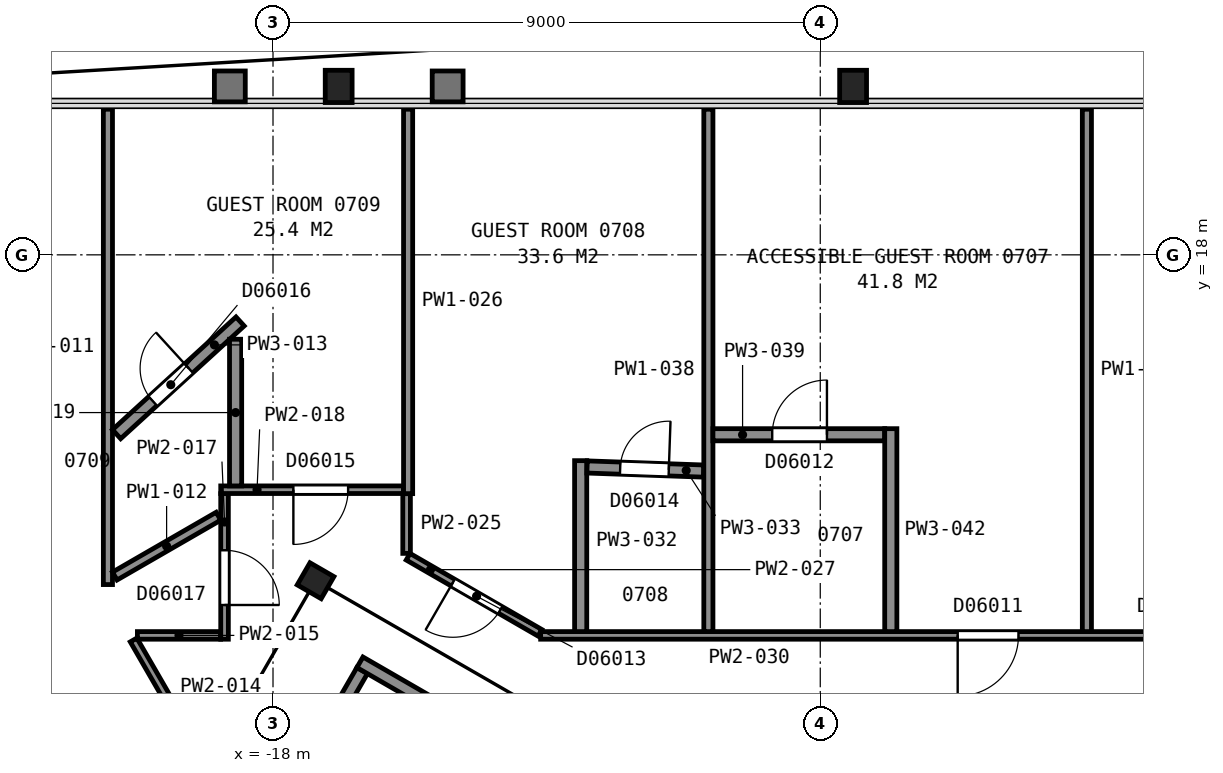
"""IFC4 building model, lengths in metres.
Left out: names, types, materials, properties, quantities, classifications, styles, units other than length and angle.
Written with IfcOpenShell. Run it as: python <this file> out.ifc"""

import sys

from ifc_helpers import new_model, si_unit, direction, frame, frame_2d, origin, origin_2d, place, context, subcontext, project, spatial, rectangle, i_section, extrude, element, fill, save


model = new_model("IFC4")
c1 = context("Model", 3, precision=1e-05, world=origin(), true_north=direction((0.0, 1.0)))
c2 = subcontext(c1, "Body", "Model", "MODEL_VIEW")
j1 = project(units=[si_unit("LENGTHUNIT", "METRE"), si_unit("PLANEANGLEUNIT", "RADIAN")], contexts=[c1])
p1 = place(None, origin())
s1 = spatial("IfcSite", under=j1, at=p1, CompositionType="ELEMENT")
p2 = place(p1, origin())
s2 = spatial("IfcBuilding", under=s1, at=p2, CompositionType="ELEMENT")
p3 = place(p2, frame((0.0, 0.0, 40.4)))
s3 = spatial("IfcBuildingStorey", under=s2, at=p3, CompositionType="ELEMENT", Elevation=40.4)
for number, where, z_axis, x_axis in (
    (1, (-8.46, 20.77, 0.0), (0.0, 0.0, 1.0), (1.0, 0.0, 0.0)),
    (2, (-16.92, 20.77, 0.0), (0.0, 0.0, 1.0), (1.0, 0.0, 0.0)),
):
    element("IfcColumn", number, at=place(p3, frame(where, z_axis=z_axis, x_axis=x_axis)), inside=s3, PredefinedType="COLUMN", context=c2, shape_type="SweptSolid", body=[
        extrude(i_section(OverallWidth=0.442, OverallDepth=0.531, WebThickness=0.066, FlangeThickness=0.106, FilletRadius=0.015, at=origin_2d()), origin(), (0.0, 0.0, 1.0), 3.575),
    ])
p4 = place(p3, frame((-17.3, 12.64, 0.0), z_axis=(0.0, 0.0, 1.0), x_axis=(0.5, 0.866025403784, 0.0)))
e3 = element("IfcColumn", 3, at=p4, inside=s3, PredefinedType="COLUMN", context=c2, shape_type="SweptSolid", body=[
    extrude(i_section(OverallWidth=0.419, OverallDepth=0.455, WebThickness=0.042, FlangeThickness=0.068, FilletRadius=0.015, at=origin_2d()), origin(), (0.0, 0.0, 1.0), 3.6),
])
p5 = place(p3, frame((-16.534, 11.162, 0.0), z_axis=(0.0, 0.0, 1.0), x_axis=(-0.49998411664, -0.866034573852, 0.0)))
e4 = element("IfcWall", 4, at=p5, inside=s3, PredefinedType="PARTITIONING", context=c2, shape_type="SweptSolid", body=[
    extrude(rectangle(XDim=2.8, YDim=0.2, at=frame_2d((1.4, 0.0))), origin(), (0.0, 0.0, 1.0), 3.35),
])
p6 = place(p5, frame((0.85, 0.0, 0.0)))
e5 = element("IfcOpeningElement", 5, at=p6, cuts=e4, PredefinedType="OPENING", context=c2, shape_type="SweptSolid", body=[
    extrude(rectangle(XDim=1.1, YDim=2.1, at=frame_2d((0.55, 1.05))), frame((0.0, 0.11, 0.0), z_axis=(0.0, -1.0, 0.0), x_axis=(1.0, 0.0, 0.0)), (0.0, 0.0, 1.0), 0.22),
])
p7 = place(p3, frame((-6.178, 5.299, 0.0), z_axis=(0.0, 0.0, 1.0), x_axis=(-0.866026010844, 0.49999894854, 0.0)))
e6 = element("IfcWall", 6, at=p7, inside=s3, PredefinedType="PARTITIONING", context=c2, shape_type="SweptSolid", body=[
    extrude(rectangle(XDim=12.0, YDim=0.2, at=frame_2d((6.0, 0.0))), origin(), (0.0, 0.0, 1.0), 3.35),
])
p8 = place(p3, frame((-20.715, 12.577, 0.0), z_axis=(0.0, 0.0, 1.0), x_axis=(0.0, 1.0, 0.0)))
e7 = element("IfcWall", 7, at=p8, inside=s3, PredefinedType="PARTITIONING", context=c2, shape_type="SweptSolid", body=[
    extrude(rectangle(XDim=7.818, YDim=0.15, at=frame_2d((3.909, 0.0))), origin(), (0.0, 0.0, 1.0), 2.613),
])
p9 = place(p3, frame((-20.602, 12.717, 0.0), z_axis=(0.0, 0.0, 1.0), x_axis=(0.866121584746, 0.499833372672, 0.0)))
e8 = element("IfcWall", 8, at=p9, inside=s3, PredefinedType="PARTITIONING", context=c2, shape_type="SweptSolid", body=[
    extrude(rectangle(XDim=1.969, YDim=0.15, at=frame_2d((0.984, 0.0))), origin(), (0.0, 0.0, 1.0), 2.613),
])
p10 = place(p3, frame((-18.541, 16.905, 0.0), z_axis=(0.0, 0.0, 1.0), x_axis=(-0.738508553587, -0.674244107337, 0.0)))
e9 = element("IfcWall", 9, at=p10, inside=s3, PredefinedType="PARTITIONING", context=c2, shape_type="SweptSolid", body=[
    extrude(rectangle(XDim=2.75, YDim=0.2, at=frame_2d((1.375, 0.0))), origin(), (0.0, 0.0, 1.0), 2.613),
])
p11 = place(p10, frame((1.143, 0.0, 0.0)))
e10 = element("IfcOpeningElement", 10, at=p11, cuts=e9, PredefinedType="OPENING", context=c2, shape_type="SweptSolid", body=[
    extrude(rectangle(XDim=0.8, YDim=2.1, at=frame_2d((0.4, 1.05))), frame((0.0, 0.11, 0.0), z_axis=(0.0, -1.0, 0.0), x_axis=(1.0, 0.0, 0.0)), (0.0, 0.0, 1.0), 0.22),
])
p12 = place(p3, frame((-20.293, 11.666, 0.0), z_axis=(0.0, 0.0, 1.0), x_axis=(0.500327160669, -0.865836435071, 0.0)))
e11 = element("IfcWall", 11, at=p12, inside=s3, PredefinedType="PARTITIONING", context=c2, shape_type="SweptSolid", body=[
    extrude(rectangle(XDim=1.805, YDim=0.125, at=frame_2d((0.903, 0.0))), origin(), (0.0, 0.0, 1.0), 2.613),
])
p13 = place(p3, frame((-20.23, 11.741, 0.0), z_axis=(0.0, 0.0, 1.0), x_axis=(1.0, 0.0, 0.0)))
e12 = element("IfcWall", 12, at=p13, inside=s3, PredefinedType="PARTITIONING", context=c2, shape_type="SweptSolid", body=[
    extrude(rectangle(XDim=1.368, YDim=0.125, at=frame_2d((0.684, 0.0))), origin(), (0.0, 0.0, 1.0), 2.613),
])
p14 = place(p3, frame((-18.797, 11.678, 0.0), z_axis=(0.0, 0.0, 1.0), x_axis=(0.0, 1.0, 0.0)))
e13 = element("IfcWall", 13, at=p14, inside=s3, PredefinedType="PARTITIONING", context=c2, shape_type="SweptSolid", body=[
    extrude(rectangle(XDim=2.394, YDim=0.125, at=frame_2d((1.197, 0.0))), origin(), (0.0, 0.0, 1.0), 2.613),
])
p15 = place(p14, frame((0.562, 0.0, 0.0)))
e14 = element("IfcOpeningElement", 14, at=p15, cuts=e13, PredefinedType="OPENING", context=c2, shape_type="SweptSolid", body=[
    extrude(rectangle(XDim=0.9, YDim=2.1, at=frame_2d((0.45, 1.05))), frame((0.0, 0.073, 0.0), z_axis=(0.0, -1.0, 0.0), x_axis=(1.0, 0.0, 0.0)), (0.0, 0.0, 1.0), 0.145),
])
p16 = place(p3, frame((-18.86, 14.137, 0.0), z_axis=(0.0, 0.0, 1.0), x_axis=(1.0, 0.0, 0.0)))
e15 = element("IfcWall", 15, at=p16, inside=s3, PredefinedType="PARTITIONING", context=c2, shape_type="SweptSolid", body=[
    extrude(rectangle(XDim=3.004, YDim=0.125, at=frame_2d((1.502, 0.0))), origin(), (0.0, 0.0, 1.0), 2.613),
])
p17 = place(p16, frame((1.195, 0.0, 0.0)))
e16 = element("IfcOpeningElement", 16, at=p17, cuts=e15, PredefinedType="OPENING", context=c2, shape_type="SweptSolid", body=[
    extrude(rectangle(XDim=0.9, YDim=2.1, at=frame_2d((0.45, 1.05))), frame((0.0, 0.073, 0.0), z_axis=(0.0, -1.0, 0.0), x_axis=(1.0, 0.0, 0.0)), (0.0, 0.0, 1.0), 0.145),
])
p18 = place(p3, frame((-18.615, 14.199, 0.0), z_axis=(0.0, 0.0, 1.0), x_axis=(0.0, 1.0, 0.0)))
e17 = element("IfcWall", 17, at=p18, inside=s3, PredefinedType="PARTITIONING", context=c2, shape_type="SweptSolid", body=[
    extrude(rectangle(XDim=2.413, YDim=0.2, at=frame_2d((1.206, 0.0))), origin(), (0.0, 0.0, 1.0), 2.613),
])
p19 = place(p3, frame((-15.803, 13.09, 0.0), z_axis=(0.0, 0.0, 1.0), x_axis=(0.0, 1.0, 0.0)))
e18 = element("IfcWall", 18, at=p19, inside=s3, PredefinedType="PARTITIONING", context=c2, shape_type="SweptSolid", body=[
    extrude(rectangle(XDim=0.982, YDim=0.125, at=frame_2d((0.491, 0.0))), origin(), (0.0, 0.0, 1.0), 2.613),
])
p20 = place(p3, frame((-15.778, 14.073, 0.0), z_axis=(0.0, 0.0, 1.0), x_axis=(0.0, 1.0, 0.0)))
e19 = element("IfcWall", 19, at=p20, inside=s3, PredefinedType="PARTITIONING", context=c2, shape_type="SweptSolid", body=[
    extrude(rectangle(XDim=6.323, YDim=0.15, at=frame_2d((3.161, 0.0))), origin(), (0.0, 0.0, 1.0), 2.613),
])
p21 = place(p3, frame((-15.778, 13.035, 0.0), z_axis=(0.0, 0.0, 1.0), x_axis=(0.866110899347, -0.499851888094, 0.0)))
e20 = element("IfcWall", 20, at=p21, inside=s3, PredefinedType="PARTITIONING", context=c2, shape_type="SweptSolid", body=[
    extrude(rectangle(XDim=2.504, YDim=0.125, at=frame_2d((1.252, 0.0))), origin(), (0.0, 0.0, 1.0), 2.613),
])
p22 = place(p21, frame((0.85, 0.0, 0.0)))
e21 = element("IfcOpeningElement", 21, at=p22, cuts=e20, PredefinedType="OPENING", context=c2, shape_type="SweptSolid", body=[
    extrude(rectangle(XDim=0.9, YDim=2.1, at=frame_2d((0.45, 1.05))), frame((0.0, 0.073, 0.0), z_axis=(0.0, -1.0, 0.0), x_axis=(1.0, 0.0, 0.0)), (0.0, 0.0, 1.0), 0.145),
])
p23 = place(p3, frame((-13.598, 11.741, 0.0), z_axis=(0.0, 0.0, 1.0), x_axis=(1.0, 0.0, 0.0)))
e22 = element("IfcWall", 22, at=p23, inside=s3, PredefinedType="PARTITIONING", context=c2, shape_type="SweptSolid", body=[
    extrude(rectangle(XDim=27.197, YDim=0.125, at=frame_2d((13.598, 0.0))), origin(), (0.0, 0.0, 1.0), 2.613),
])
p24 = place(p23, frame((20.107, 0.0, 0.0)))
e23 = element("IfcOpeningElement", 23, at=p24, cuts=e22, PredefinedType="OPENING", context=c2, shape_type="SweptSolid", body=[
    extrude(rectangle(XDim=0.9, YDim=2.1, at=frame_2d((0.45, 1.05))), frame((0.0, 0.073, 0.0), z_axis=(0.0, -1.0, 0.0), x_axis=(1.0, 0.0, 0.0)), (0.0, 0.0, 1.0), 0.145),
])
p25 = place(p23, frame((16.97, 0.0, 0.0)))
e24 = element("IfcOpeningElement", 24, at=p25, cuts=e22, PredefinedType="OPENING", context=c2, shape_type="SweptSolid", body=[
    extrude(rectangle(XDim=0.9, YDim=2.1, at=frame_2d((0.45, 1.05))), frame((0.0, 0.073, 0.0), z_axis=(0.0, -1.0, 0.0), x_axis=(1.0, 0.0, 0.0)), (0.0, 0.0, 1.0), 0.145),
])
p26 = place(p23, frame((9.934, 0.0, 0.0)))
e25 = element("IfcOpeningElement", 25, at=p26, cuts=e22, PredefinedType="OPENING", context=c2, shape_type="SweptSolid", body=[
    extrude(rectangle(XDim=0.9, YDim=2.1, at=frame_2d((0.45, 1.05))), frame((0.0, 0.073, 0.0), z_axis=(0.0, -1.0, 0.0), x_axis=(1.0, 0.0, 0.0)), (0.0, 0.0, 1.0), 0.145),
])
p27 = place(p23, frame((6.858, 0.0, 0.0)))
e26 = element("IfcOpeningElement", 26, at=p27, cuts=e22, PredefinedType="OPENING", context=c2, shape_type="SweptSolid", body=[
    extrude(rectangle(XDim=1.0, YDim=2.1, at=frame_2d((0.5, 1.05))), frame((0.0, 0.073, 0.0), z_axis=(0.0, -1.0, 0.0), x_axis=(1.0, 0.0, 0.0)), (0.0, 0.0, 1.0), 0.145),
])
p28 = place(p3, frame((-12.94, 11.803, 0.0), z_axis=(0.0, 0.0, 1.0), x_axis=(0.0, 1.0, 0.0)))
e27 = element("IfcWall", 27, at=p28, inside=s3, PredefinedType="PARTITIONING", context=c2, shape_type="SweptSolid", body=[
    extrude(rectangle(XDim=2.812, YDim=0.2, at=frame_2d((1.406, 0.0))), origin(), (0.0, 0.0, 1.0), 2.613),
])
p29 = place(p3, frame((-10.918, 14.444, 0.0), z_axis=(0.0, 0.0, 1.0), x_axis=(-0.999382486529, 0.035137524367, 0.0)))
e28 = element("IfcWall", 28, at=p29, inside=s3, PredefinedType="PARTITIONING", context=c2, shape_type="SweptSolid", body=[
    extrude(rectangle(XDim=1.918, YDim=0.2, at=frame_2d((0.959, 0.0))), origin(), (0.0, 0.0, 1.0), 2.613),
])
p30 = place(p29, frame((0.573, 0.0, 0.0)))
e29 = element("IfcOpeningElement", 29, at=p30, cuts=e28, PredefinedType="OPENING", context=c2, shape_type="SweptSolid", body=[
    extrude(rectangle(XDim=0.8, YDim=2.1, at=frame_2d((0.4, 1.05))), frame((0.0, 0.11, 0.0), z_axis=(0.0, -1.0, 0.0), x_axis=(1.0, 0.0, 0.0)), (0.0, 0.0, 1.0), 0.22),
])
p31 = place(p3, frame((-10.84, 11.803, 0.0), z_axis=(0.0, 0.0, 1.0), x_axis=(0.0, 1.0, 0.0)))
e30 = element("IfcWall", 30, at=p31, inside=s3, PredefinedType="PARTITIONING", context=c2, shape_type="SweptSolid", body=[
    extrude(rectangle(XDim=8.592, YDim=0.15, at=frame_2d((4.296, 0.0))), origin(), (0.0, 0.0, 1.0), 2.613),
])
p32 = place(p3, frame((-7.94, 15.041, 0.0), z_axis=(0.0, 0.0, 1.0), x_axis=(-1.0, 0.0, 0.0)))
e31 = element("IfcWall", 31, at=p32, inside=s3, PredefinedType="PARTITIONING", context=c2, shape_type="SweptSolid", body=[
    extrude(rectangle(XDim=2.825, YDim=0.2, at=frame_2d((1.413, 0.0))), origin(), (0.0, 0.0, 1.0), 2.613),
])
p33 = place(p32, frame((0.95, 0.0, 0.0)))
e32 = element("IfcOpeningElement", 32, at=p33, cuts=e31, PredefinedType="OPENING", context=c2, shape_type="SweptSolid", body=[
    extrude(rectangle(XDim=0.9, YDim=2.1, at=frame_2d((0.45, 1.05))), frame((0.0, 0.11, 0.0), z_axis=(0.0, -1.0, 0.0), x_axis=(1.0, 0.0, 0.0)), (0.0, 0.0, 1.0), 0.22),
])
p34 = place(p3, frame((-7.84, 11.803, 0.0), z_axis=(0.0, 0.0, 1.0), x_axis=(0.0, 1.0, 0.0)))
e33 = element("IfcWall", 33, at=p34, inside=s3, PredefinedType="PARTITIONING", context=c2, shape_type="SweptSolid", body=[
    extrude(rectangle(XDim=3.338, YDim=0.2, at=frame_2d((1.669, 0.0))), origin(), (0.0, 0.0, 1.0), 2.613),
])
p35 = place(p3, frame((-4.615, 11.803, 0.0), z_axis=(0.0, 0.0, 1.0), x_axis=(0.0, 1.0, 0.0)))
e34 = element("IfcWall", 34, at=p35, inside=s3, PredefinedType="PARTITIONING", context=c2, shape_type="SweptSolid", body=[
    extrude(rectangle(XDim=8.592, YDim=0.15, at=frame_2d((4.296, 0.0))), origin(), (0.0, 0.0, 1.0), 2.613),
])
p36 = place(p11, origin())
e35 = element("IfcDoor", 35, at=p36, inside=s3, OperationType="SINGLE_SWING_LEFT", PredefinedType="DOOR", context=c2, shape_type="SweptSolid", body=[
    extrude(rectangle(XDim=0.8, YDim=2.1, at=frame_2d((0.4, 1.05))), frame((0.0, 0.025, 0.0), z_axis=(0.0, -1.0, 0.0), x_axis=(1.0, 0.0, 0.0)), (0.0, 0.0, 1.0), 0.05),
])
fill(e10, e35)
p37 = place(p15, origin())
e36 = element("IfcDoor", 36, at=p37, inside=s3, OperationType="SINGLE_SWING_LEFT", PredefinedType="DOOR", context=c2, shape_type="SweptSolid", body=[
    extrude(rectangle(XDim=0.9, YDim=2.1, at=frame_2d((0.45, 1.05))), frame((0.0, 0.025, 0.0), z_axis=(0.0, -1.0, 0.0), x_axis=(1.0, 0.0, 0.0)), (0.0, 0.0, 1.0), 0.05),
])
fill(e14, e36)
p38 = place(p17, origin())
e37 = element("IfcDoor", 37, at=p38, inside=s3, OperationType="SINGLE_SWING_LEFT", PredefinedType="DOOR", context=c2, shape_type="SweptSolid", body=[
    extrude(rectangle(XDim=0.9, YDim=2.1, at=frame_2d((0.45, 1.05))), frame((0.0, 0.025, 0.0), z_axis=(0.0, -1.0, 0.0), x_axis=(1.0, 0.0, 0.0)), (0.0, 0.0, 1.0), 0.05),
])
fill(e16, e37)
p39 = place(p22, origin())
e38 = element("IfcDoor", 38, at=p39, inside=s3, OperationType="SINGLE_SWING_LEFT", PredefinedType="DOOR", context=c2, shape_type="SweptSolid", body=[
    extrude(rectangle(XDim=0.9, YDim=2.1, at=frame_2d((0.45, 1.05))), frame((0.0, 0.025, 0.0), z_axis=(0.0, -1.0, 0.0), x_axis=(1.0, 0.0, 0.0)), (0.0, 0.0, 1.0), 0.05),
])
fill(e21, e38)
p40 = place(p27, origin())
e39 = element("IfcDoor", 39, at=p40, inside=s3, OperationType="SINGLE_SWING_LEFT", PredefinedType="DOOR", context=c2, shape_type="SweptSolid", body=[
    extrude(rectangle(XDim=1.0, YDim=2.1, at=frame_2d((0.5, 1.05))), frame((0.0, 0.025, 0.0), z_axis=(0.0, -1.0, 0.0), x_axis=(1.0, 0.0, 0.0)), (0.0, 0.0, 1.0), 0.05),
])
fill(e26, e39)
p41 = place(p30, origin())
e40 = element("IfcDoor", 40, at=p41, inside=s3, OperationType="SINGLE_SWING_LEFT", PredefinedType="DOOR", context=c2, shape_type="SweptSolid", body=[
    extrude(rectangle(XDim=0.8, YDim=2.1, at=frame_2d((0.4, 1.05))), frame((0.0, 0.025, 0.0), z_axis=(0.0, -1.0, 0.0), x_axis=(1.0, 0.0, 0.0)), (0.0, 0.0, 1.0), 0.05),
])
fill(e29, e40)
p42 = place(p33, origin())
e41 = element("IfcDoor", 41, at=p42, inside=s3, OperationType="SINGLE_SWING_LEFT", PredefinedType="DOOR", context=c2, shape_type="SweptSolid", body=[
    extrude(rectangle(XDim=0.9, YDim=2.1, at=frame_2d((0.45, 1.05))), frame((0.0, 0.025, 0.0), z_axis=(0.0, -1.0, 0.0), x_axis=(1.0, 0.0, 0.0)), (0.0, 0.0, 1.0), 0.05),
])
fill(e32, e41)
save(model, sys.argv[1])
